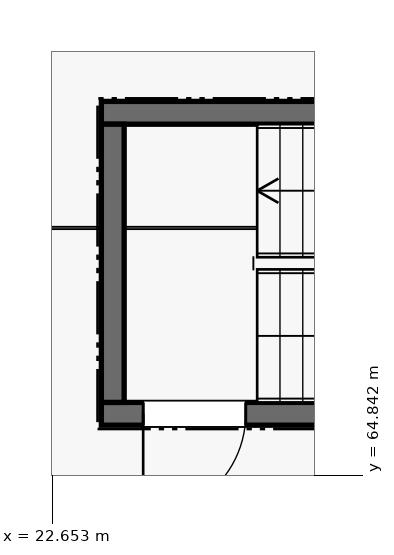
"""IFC4 building model, lengths in metres.
Left out: names, types, materials, properties, quantities, classifications, styles, units other than length and angle.
Written with IfcOpenShell. Run it as: python <this file> out.ifc"""

import sys

from ifc_helpers import new_model, si_unit, direction, frame, frame_2d, origin, place, context, subcontext, project, spatial, rectangle, extrude, element, fill, save


model = new_model("IFC4")
c1 = context("Model", 3, precision=1e-05, world=origin(), true_north=direction((0.0, 1.0)))
c2 = subcontext(c1, "Body", "Model", "MODEL_VIEW")
j1 = project(units=[si_unit("LENGTHUNIT", "METRE"), si_unit("PLANEANGLEUNIT", "RADIAN")], contexts=[c1])
p1 = place(None, origin())
s1 = spatial("IfcSite", under=j1, at=p1, CompositionType="ELEMENT")
p2 = place(p1, origin())
s2 = spatial("IfcBuilding", under=s1, at=p2, CompositionType="ELEMENT")
p3 = place(p2, origin())
s3 = spatial("IfcBuildingStorey", under=s2, at=p3, CompositionType="ELEMENT", Elevation=0.0)
p4 = place(p3, frame((23.3, 65.65, 0.0), z_axis=(0.0, 0.0, 1.0), x_axis=(1.0, 0.0, 0.0)))
e1 = element("IfcWall", 1, at=p4, inside=s3, PredefinedType="SHEAR", context=c2, shape_type="SweptSolid", body=[
    extrude(rectangle(XDim=8.65, YDim=0.3, at=frame_2d((4.325, 0.0))), origin(), (0.0, 0.0, 1.0), 5.1),
])
p5 = place(p4, frame((0.55, 0.0, 0.0)))
e2 = element("IfcOpeningElement", 2, at=p5, cuts=e1, PredefinedType="OPENING", context=c2, shape_type="SweptSolid", body=[
    extrude(rectangle(XDim=1.35, YDim=2.2, at=frame_2d((0.675, 1.1))), frame((0.0, 0.16, 0.0), z_axis=(0.0, -1.0, 0.0), x_axis=(1.0, 0.0, 0.0)), (0.0, 0.0, 1.0), 0.32),
])
p6 = place(p3, frame((31.95, 69.61, 0.0), z_axis=(0.0, 0.0, 1.0), x_axis=(-1.0, 0.0, 0.0)))
e3 = element("IfcWall", 3, at=p6, inside=s3, PredefinedType="SHEAR", context=c2, shape_type="SweptSolid", body=[
    extrude(rectangle(XDim=8.65, YDim=0.3, at=frame_2d((4.325, 0.0))), origin(), (0.0, 0.0, 1.0), 5.1),
])
p7 = place(p3, frame((23.45, 69.46, 0.0), z_axis=(0.0, 0.0, 1.0), x_axis=(0.0, -1.0, 0.0)))
e4 = element("IfcWall", 4, at=p7, inside=s3, PredefinedType="SHEAR", context=c2, shape_type="SweptSolid", body=[
    extrude(rectangle(XDim=3.66, YDim=0.3, at=frame_2d((1.83, 0.0))), origin(), (0.0, 0.0, 1.0), 5.1),
])
p8 = place(p5, frame((1.35, 0.0, 0.0), z_axis=(0.0, 0.0, 1.0), x_axis=(-1.0, 0.0, 0.0)))
e5 = element("IfcDoor", 5, at=p8, inside=s3, OperationType="SINGLE_SWING_RIGHT", PredefinedType="DOOR", context=c2, shape_type="SweptSolid", body=[
    extrude(rectangle(XDim=1.35, YDim=2.2, at=frame_2d((0.675, 1.1))), frame((0.0, 0.025, 0.0), z_axis=(0.0, -1.0, 0.0), x_axis=(1.0, 0.0, 0.0)), (0.0, 0.0, 1.0), 0.05),
])
fill(e2, e5)
save(model, sys.argv[1])
